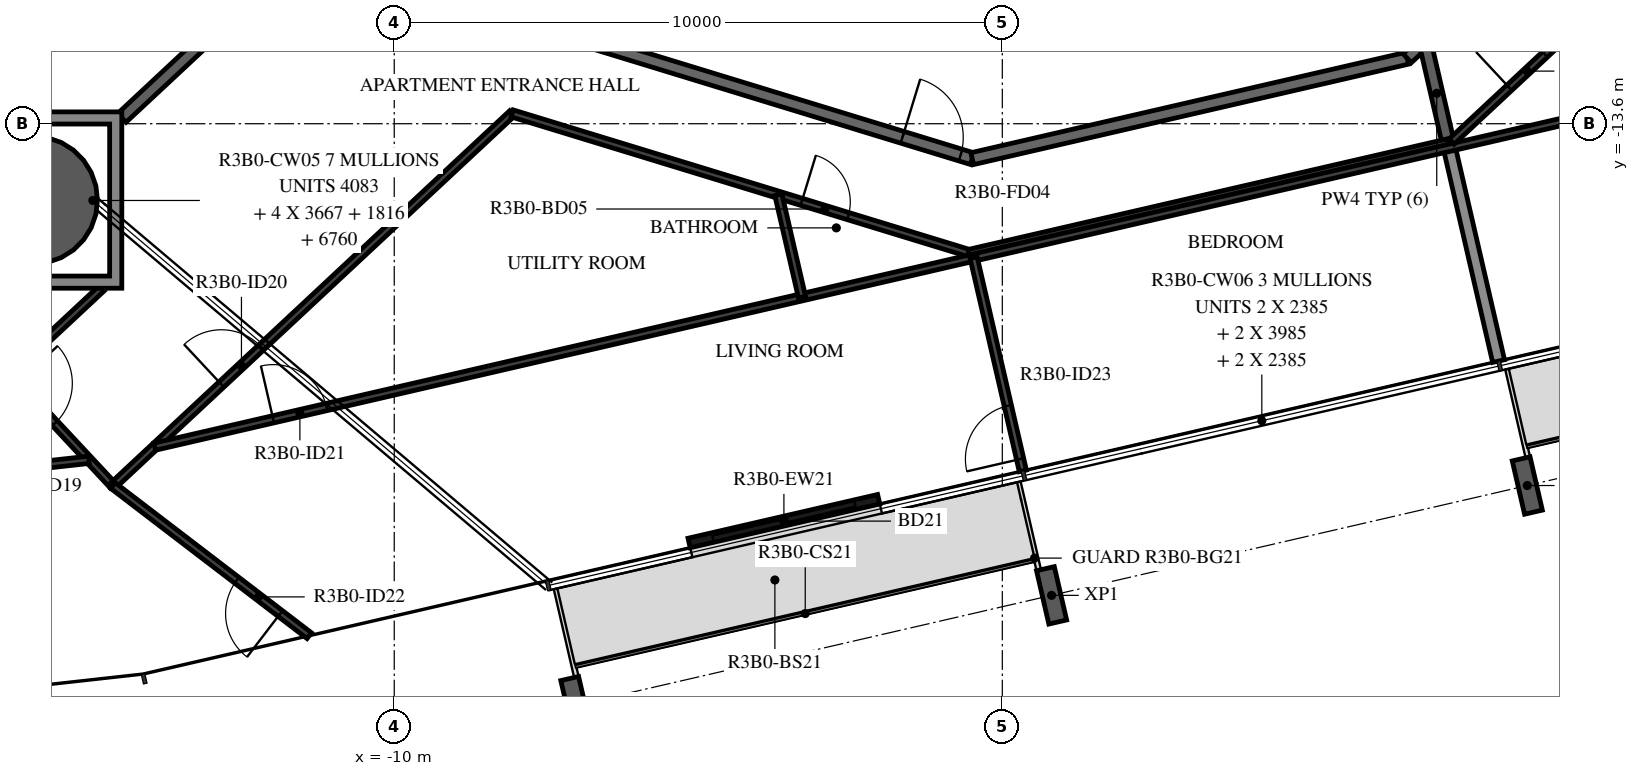
"""IFC4 building model, lengths in metres.
Left out: names, types, materials, properties, quantities, classifications, styles, units other than length and angle.
Written with IfcOpenShell. Run it as: python <this file> out.ifc"""

import sys

from ifc_helpers import new_model, si_unit, direction, frame, frame_2d, origin, origin_2d, place, context, subcontext, project, spatial, polyline, rectangle, hollow_circle, i_section, outline, extrude, element, fill, save


model = new_model("IFC4")
c1 = context("Model", 3, precision=1e-05, world=origin(), true_north=direction((0.0, 1.0)))
c2 = subcontext(c1, "Body", "Model", "MODEL_VIEW")
j1 = project(units=[si_unit("LENGTHUNIT", "METRE"), si_unit("PLANEANGLEUNIT", "RADIAN")], contexts=[c1])
p1 = place(None, origin())
s1 = spatial("IfcSite", under=j1, at=p1, CompositionType="ELEMENT")
p2 = place(p1, origin())
s2 = spatial("IfcBuilding", under=s1, at=p2, CompositionType="ELEMENT")
p3 = place(p2, frame((0.0, 0.0, 127.4)))
s3 = spatial("IfcBuildingStorey", under=s2, at=p3, CompositionType="ELEMENT", Elevation=127.4)
p4 = place(p3, frame((-15.93, -14.855, -0.38), z_axis=(0.0, 0.0, 1.0), x_axis=(1.0, 0.0, 0.0)))
e1 = element("IfcColumn", 1, at=p4, inside=s3, PredefinedType="COLUMN", context=c2, shape_type="SweptSolid", body=[
    extrude(hollow_circle(Radius=1.05, WallThickness=0.05, at=origin_2d()), origin(), (0.0, 0.0, 1.0), 3.5),
])
for number, where, z_axis, x_axis in (
    (2, (8.634, -19.55, -0.38), (0.0, 0.0, 1.0), (-0.974, -0.225, 0.0)),
    (3, (-7.013, -23.162, -0.38), (0.0, 0.0, 1.0), (-0.974, -0.225, 0.0)),
    (4, (0.81, -21.356, -0.38), (0.0, 0.0, 1.0), (-0.974, -0.225, 0.0)),
):
    element("IfcColumn", number, at=place(p3, frame(where, z_axis=z_axis, x_axis=x_axis)), inside=s3, PredefinedType="COLUMN", context=c2, shape_type="SweptSolid", body=[
        extrude(i_section(OverallWidth=0.3, OverallDepth=0.9, WebThickness=0.019, FlangeThickness=0.035, FilletRadius=0.03, at=origin_2d()), origin(), (0.0, 0.0, 1.0), 3.5),
    ])
p5 = place(p3, frame((-5.151, -20.495, 0.0), z_axis=(0.0, 0.0, 1.0), x_axis=(0.974377048991, 0.224920800284, 0.0)))
e5 = element("IfcWall", 5, at=p5, inside=s3, PredefinedType="STANDARD", context=c2, shape_type="SweptSolid", body=[
    extrude(rectangle(XDim=3.2, YDim=0.16, at=frame_2d((1.6, 0.0))), origin(), (0.0, 0.0, 1.0), 3.12),
])
p6 = place(p5, frame((0.4, 0.0, 0.0)))
e6 = element("IfcOpeningElement", 6, at=p6, cuts=e5, PredefinedType="OPENING", context=c2, shape_type="SweptSolid", body=[
    extrude(rectangle(XDim=2.4, YDim=2.4, at=frame_2d((1.2, 1.2))), frame((0.0, 0.09, 0.0), z_axis=(0.0, -1.0, 0.0), x_axis=(1.0, 0.0, 0.0)), (0.0, 0.0, 1.0), 0.18),
])
p7 = place(p3, frame((-7.516, -12.028, 0.0), z_axis=(0.0, 0.0, 1.0), x_axis=(0.956306642771, -0.292365533182, 0.0)))
e7 = element("IfcWall", 7, at=p7, inside=s3, PredefinedType="STANDARD", context=c2, shape_type="SweptSolid", body=[
    extrude(rectangle(XDim=7.342, YDim=0.2, at=frame_2d((3.671, 0.0))), origin(), (0.0, 0.0, 1.0), 3.12),
])
p8 = place(p7, frame((6.142, 0.0, 0.0)))
e8 = element("IfcOpeningElement", 8, at=p8, cuts=e7, PredefinedType="OPENING", context=c2, shape_type="SweptSolid", body=[
    extrude(rectangle(XDim=1.0, YDim=2.1, at=frame_2d((0.5, 1.05))), frame((0.0, 0.11, 0.0), z_axis=(0.0, -1.0, 0.0), x_axis=(1.0, 0.0, 0.0)), (0.0, 0.0, 1.0), 0.22),
])
p9 = place(p3, frame((-0.495, -14.175, 0.0), z_axis=(0.0, 0.0, 1.0), x_axis=(0.974376622151, 0.224922649383, 0.0)))
e9 = element("IfcWall", 9, at=p9, inside=s3, PredefinedType="STANDARD", context=c2, shape_type="SweptSolid", body=[
    extrude(rectangle(XDim=7.342, YDim=0.2, at=frame_2d((3.671, 0.0))), origin(), (0.0, 0.0, 1.0), 3.12),
])
p10 = place(p3, frame((6.659, -12.523, 0.0), z_axis=(0.0, 0.0, 1.0), x_axis=(0.731350455479, 0.682001841105, 0.0)))
e10 = element("IfcWall", 10, at=p10, inside=s3, PredefinedType="STANDARD", context=c2, shape_type="SweptSolid", body=[
    extrude(rectangle(XDim=7.342, YDim=0.2, at=frame_2d((3.671, 0.0))), origin(), (0.0, 0.0, 1.0), 3.12),
])
p11 = place(p10, frame((0.597, 0.0, 0.0)))
e11 = element("IfcOpeningElement", 11, at=p11, cuts=e10, PredefinedType="OPENING", context=c2, shape_type="SweptSolid", body=[
    extrude(rectangle(XDim=1.0, YDim=2.1, at=frame_2d((0.5, 1.05))), frame((0.0, 0.11, 0.0), z_axis=(0.0, -1.0, 0.0), x_axis=(1.0, 0.0, 0.0)), (0.0, 0.0, 1.0), 0.22),
])
p12 = place(p3, frame((-14.479, -13.504, 0.0), z_axis=(0.0, 0.0, 1.0), x_axis=(0.731329393611, 0.682024426278, 0.0)))
e12 = element("IfcWall", 12, at=p12, inside=s3, PredefinedType="STANDARD", context=c2, shape_type="SweptSolid", body=[
    extrude(rectangle(XDim=5.892, YDim=0.2, at=frame_2d((2.946, 0.0))), origin(), (0.0, 0.0, 1.0), 3.12),
])
p13 = place(p3, frame((7.34, -13.946, 0.0), z_axis=(0.0, 0.0, 1.0), x_axis=(-0.224849249613, 0.974393562658, 0.0)))
e13 = element("IfcWall", 13, at=p13, inside=s3, PredefinedType="STANDARD", context=c2, shape_type="SweptSolid", body=[
    extrude(rectangle(XDim=1.738, YDim=0.2, at=frame_2d((0.869, 0.0))), origin(), (0.0, 0.0, 1.0), 3.12),
])
p14 = place(p3, frame((8.161, -17.504, 0.0), z_axis=(0.0, 0.0, 1.0), x_axis=(-0.224943703639, 0.9743717618, 0.0)))
e14 = element("IfcWall", 14, at=p14, inside=s3, PredefinedType="STANDARD", context=c2, shape_type="SweptSolid", body=[
    extrude(rectangle(XDim=3.6, YDim=0.2, at=frame_2d((1.8, 0.0))), origin(), (0.0, 0.0, 1.0), 2.73),
])
p15 = place(p3, frame((-14.81, -16.305, 0.0), z_axis=(0.0, 0.0, 1.0), x_axis=(-0.73134426424, -0.682008480272, 0.0)))
e15 = element("IfcWall", 15, at=p15, inside=s3, PredefinedType="PARTITIONING", context=c2, shape_type="SweptSolid", body=[
    extrude(rectangle(XDim=2.078, YDim=0.12, at=frame_2d((1.039, 0.0))), origin(), (0.0, 0.0, 1.0), 3.12),
])
p16 = place(p3, frame((-16.33, -17.723, 0.0), z_axis=(0.0, 0.0, 1.0), x_axis=(0.682018966854, -0.731334484933, 0.0)))
e16 = element("IfcWall", 16, at=p16, inside=s3, PredefinedType="PARTITIONING", context=c2, shape_type="SweptSolid", body=[
    extrude(rectangle(XDim=2.5, YDim=0.12, at=frame_2d((1.25, 0.0))), origin(), (0.0, 0.0, 1.0), 3.12),
])
p17 = place(p16, frame((0.2, 0.0, 0.0)))
e17 = element("IfcOpeningElement", 17, at=p17, cuts=e16, PredefinedType="OPENING", context=c2, shape_type="SweptSolid", body=[
    extrude(rectangle(XDim=0.9, YDim=2.1, at=frame_2d((0.45, 1.05))), frame((0.0, 0.07, 0.0), z_axis=(0.0, -1.0, 0.0), x_axis=(1.0, 0.0, 0.0)), (0.0, 0.0, 1.0), 0.14),
])
p18 = place(p3, frame((-14.625, -19.551, 0.0), z_axis=(0.0, 0.0, 1.0), x_axis=(0.731348282704, 0.682004171091, 0.0)))
e18 = element("IfcWall", 18, at=p18, inside=s3, PredefinedType="PARTITIONING", context=c2, shape_type="SweptSolid", body=[
    extrude(rectangle(XDim=8.975, YDim=0.12, at=frame_2d((4.488, 0.0))), origin(), (0.0, 0.0, 1.0), 3.12),
])
p19 = place(p18, frame((2.438, 0.0, 0.0)))
e19 = element("IfcOpeningElement", 19, at=p19, cuts=e18, PredefinedType="OPENING", context=c2, shape_type="SweptSolid", body=[
    extrude(rectangle(XDim=0.9, YDim=2.1, at=frame_2d((0.45, 1.05))), frame((0.0, 0.07, 0.0), z_axis=(0.0, -1.0, 0.0), x_axis=(1.0, 0.0, 0.0)), (0.0, 0.0, 1.0), 0.14),
])
p20 = place(p3, frame((-8.061, -13.43, 0.0), z_axis=(0.0, 0.0, 1.0), x_axis=(0.956302336653, -0.292379617814, 0.0)))
e20 = element("IfcWall", 20, at=p20, inside=s3, PredefinedType="PARTITIONING", context=c2, shape_type="SweptSolid", body=[
    extrude(rectangle(XDim=7.855, YDim=0.12, at=frame_2d((3.927, 0.0))), origin(), (0.0, 0.0, 1.0), 3.12),
])
p21 = place(p20, frame((4.979, 0.0, 0.0)))
e21 = element("IfcOpeningElement", 21, at=p21, cuts=e20, PredefinedType="OPENING", context=c2, shape_type="SweptSolid", body=[
    extrude(rectangle(XDim=0.8, YDim=2.1, at=frame_2d((0.4, 1.05))), frame((0.0, 0.07, 0.0), z_axis=(0.0, -1.0, 0.0), x_axis=(1.0, 0.0, 0.0)), (0.0, 0.0, 1.0), 0.14),
])
p22 = place(p3, frame((-0.549, -15.727, 0.0), z_axis=(0.0, 0.0, 1.0), x_axis=(0.97436829548, 0.224958717908, 0.0)))
e22 = element("IfcWall", 22, at=p22, inside=s3, PredefinedType="PARTITIONING", context=c2, shape_type="SweptSolid", body=[
    extrude(rectangle(XDim=8.087, YDim=0.12, at=frame_2d((4.044, 0.0))), origin(), (0.0, 0.0, 1.0), 3.12),
])
p23 = place(p3, frame((-15.956, -19.231, 0.0), z_axis=(0.0, 0.0, 1.0), x_axis=(0.993867897435, 0.110573968218, 0.0)))
e23 = element("IfcWall", 23, at=p23, inside=s3, PredefinedType="PARTITIONING", context=c2, shape_type="SweptSolid", body=[
    extrude(rectangle(XDim=0.941, YDim=0.12, at=frame_2d((0.47, 0.0))), origin(), (0.0, 0.0, 1.0), 3.12),
])
p24 = place(p3, frame((-11.397, -22.019, 0.0), z_axis=(0.0, 0.0, 1.0), x_axis=(-0.794391941464, 0.60740550157, 0.0)))
e24 = element("IfcWall", 24, at=p24, inside=s3, PredefinedType="PARTITIONING", context=c2, shape_type="SweptSolid", body=[
    extrude(rectangle(XDim=4.063, YDim=0.12, at=frame_2d((2.032, 0.0))), origin(), (0.0, 0.0, 1.0), 3.12),
])
p25 = place(p24, frame((0.6, 0.0, 0.0)))
e25 = element("IfcOpeningElement", 25, at=p25, cuts=e24, PredefinedType="OPENING", context=c2, shape_type="SweptSolid", body=[
    extrude(rectangle(XDim=0.9, YDim=2.1, at=frame_2d((0.45, 1.05))), frame((0.0, 0.07, 0.0), z_axis=(0.0, -1.0, 0.0), x_axis=(1.0, 0.0, 0.0)), (0.0, 0.0, 1.0), 0.14),
])
p26 = place(p3, frame((-13.939, -18.911, 0.0), z_axis=(0.0, 0.0, 1.0), x_axis=(0.974369607456, 0.224953035245, 0.0)))
e26 = element("IfcWall", 26, at=p26, inside=s3, PredefinedType="PARTITIONING", context=c2, shape_type="SweptSolid", body=[
    extrude(rectangle(XDim=33.934, YDim=0.12, at=frame_2d((16.967, 0.0))), origin(), (0.0, 0.0, 1.0), 3.12),
])
p27 = place(p26, frame((2.0, 0.0, 0.0)))
e27 = element("IfcOpeningElement", 27, at=p27, cuts=e26, PredefinedType="OPENING", context=c2, shape_type="SweptSolid", body=[
    extrude(rectangle(XDim=0.9, YDim=2.1, at=frame_2d((0.45, 1.05))), frame((0.0, 0.07, 0.0), z_axis=(0.0, -1.0, 0.0), x_axis=(1.0, 0.0, 0.0)), (0.0, 0.0, 1.0), 0.14),
])
p28 = place(p26, frame((28.154, 0.0, 0.0)))
e28 = element("IfcOpeningElement", 28, at=p28, cuts=e26, PredefinedType="OPENING", context=c2, shape_type="SweptSolid", body=[
    extrude(rectangle(XDim=0.9, YDim=2.1, at=frame_2d((0.45, 1.05))), frame((0.0, 0.07, 0.0), z_axis=(0.0, -1.0, 0.0), x_axis=(1.0, 0.0, 0.0)), (0.0, 0.0, 1.0), 0.14),
])
p29 = place(p26, frame((30.039, 0.0, 0.0)))
e29 = element("IfcOpeningElement", 29, at=p29, cuts=e26, PredefinedType="OPENING", context=c2, shape_type="SweptSolid", body=[
    extrude(rectangle(XDim=0.9, YDim=2.1, at=frame_2d((0.45, 1.05))), frame((0.0, 0.07, 0.0), z_axis=(0.0, -1.0, 0.0), x_axis=(1.0, 0.0, 0.0)), (0.0, 0.0, 1.0), 0.14),
])
p30 = place(p3, frame((-3.294, -16.454, 0.0), z_axis=(0.0, 0.0, 1.0), x_axis=(-0.224890438003, 0.974384057184, 0.0)))
e30 = element("IfcWall", 30, at=p30, inside=s3, PredefinedType="PARTITIONING", context=c2, shape_type="SweptSolid", body=[
    extrude(rectangle(XDim=1.729, YDim=0.12, at=frame_2d((0.865, 0.0))), origin(), (0.0, 0.0, 1.0), 3.12),
])
p31 = place(p3, frame((0.338, -19.31, 0.0), z_axis=(0.0, 0.0, 1.0), x_axis=(-0.224943703639, 0.9743717618, 0.0)))
e31 = element("IfcWall", 31, at=p31, inside=s3, PredefinedType="PARTITIONING", context=c2, shape_type="SweptSolid", body=[
    extrude(rectangle(XDim=3.6, YDim=0.12, at=frame_2d((1.8, 0.0))), origin(), (0.0, 0.0, 1.0), 2.73),
])
p32 = place(p31, frame((0.2, 0.0, 0.0)))
e32 = element("IfcOpeningElement", 32, at=p32, cuts=e31, PredefinedType="OPENING", context=c2, shape_type="SweptSolid", body=[
    extrude(rectangle(XDim=0.9, YDim=2.1, at=frame_2d((0.45, 1.05))), frame((0.0, 0.07, 0.0), z_axis=(0.0, -1.0, 0.0), x_axis=(1.0, 0.0, 0.0)), (0.0, 0.0, 1.0), 0.14),
])
p33 = place(p3, frame((7.388, -13.894, 0.0), z_axis=(0.0, 0.0, 1.0), x_axis=(0.731346321845, 0.682006273815, 0.0)))
e33 = element("IfcWall", 33, at=p33, inside=s3, PredefinedType="PARTITIONING", context=c2, shape_type="SweptSolid", body=[
    extrude(rectangle(XDim=7.585, YDim=0.12, at=frame_2d((3.793, 0.0))), origin(), (0.0, 0.0, 1.0), 3.12),
])
p34 = place(p33, frame((1.3, 0.0, 0.0)))
e34 = element("IfcOpeningElement", 34, at=p34, cuts=e33, PredefinedType="OPENING", context=c2, shape_type="SweptSolid", body=[
    extrude(rectangle(XDim=0.8, YDim=2.1, at=frame_2d((0.4, 1.05))), frame((0.0, 0.07, 0.0), z_axis=(0.0, -1.0, 0.0), x_axis=(1.0, 0.0, 0.0)), (0.0, 0.0, 1.0), 0.14),
])
p35 = place(p3, origin())
e35 = element("IfcWall", 35, at=p35, inside=s3, PredefinedType="STANDARD", context=c2, shape_type="SweptSolid", body=[
    extrude(outline(polyline([(-14.48, -13.405), (-14.48, -16.305), (-17.38, -16.305), (-17.38, -13.405), (-14.48, -13.405)]), holes=[polyline([(-17.18, -16.105), (-14.68, -16.105), (-14.68, -13.605), (-17.18, -13.605), (-17.18, -16.105)])]), origin(), (0.0, 0.0, 1.0), 3.12),
])
p36 = place(p6, origin())
e36 = element("IfcDoor", 36, at=p36, inside=s3, OperationType="DOUBLE_DOOR_SLIDING", PredefinedType="DOOR", context=c2, shape_type="SweptSolid", body=[
    extrude(rectangle(XDim=2.4, YDim=2.4, at=frame_2d((1.2, 1.2))), frame((0.0, 0.025, 0.0), z_axis=(0.0, -1.0, 0.0), x_axis=(1.0, 0.0, 0.0)), (0.0, 0.0, 1.0), 0.05),
])
fill(e6, e36)
p37 = place(p8, origin())
e37 = element("IfcDoor", 37, at=p37, inside=s3, OperationType="SINGLE_SWING_LEFT", PredefinedType="DOOR", context=c2, shape_type="SweptSolid", body=[
    extrude(rectangle(XDim=1.0, YDim=2.1, at=frame_2d((0.5, 1.05))), frame((0.0, 0.025, 0.0), z_axis=(0.0, -1.0, 0.0), x_axis=(1.0, 0.0, 0.0)), (0.0, 0.0, 1.0), 0.05),
])
fill(e8, e37)
p38 = place(p17, origin())
e38 = element("IfcDoor", 38, at=p38, inside=s3, OperationType="SINGLE_SWING_LEFT", PredefinedType="DOOR", context=c2, shape_type="SweptSolid", body=[
    extrude(rectangle(XDim=0.9, YDim=2.1, at=frame_2d((0.45, 1.05))), frame((0.0, 0.025, 0.0), z_axis=(0.0, -1.0, 0.0), x_axis=(1.0, 0.0, 0.0)), (0.0, 0.0, 1.0), 0.05),
])
fill(e17, e38)
p39 = place(p19, origin())
e39 = element("IfcDoor", 39, at=p39, inside=s3, OperationType="SINGLE_SWING_LEFT", PredefinedType="DOOR", context=c2, shape_type="SweptSolid", body=[
    extrude(rectangle(XDim=0.9, YDim=2.1, at=frame_2d((0.45, 1.05))), frame((0.0, 0.025, 0.0), z_axis=(0.0, -1.0, 0.0), x_axis=(1.0, 0.0, 0.0)), (0.0, 0.0, 1.0), 0.05),
])
fill(e19, e39)
p40 = place(p21, origin())
e40 = element("IfcDoor", 40, at=p40, inside=s3, OperationType="SINGLE_SWING_LEFT", PredefinedType="DOOR", context=c2, shape_type="SweptSolid", body=[
    extrude(rectangle(XDim=0.8, YDim=2.1, at=frame_2d((0.4, 1.05))), frame((0.0, 0.025, 0.0), z_axis=(0.0, -1.0, 0.0), x_axis=(1.0, 0.0, 0.0)), (0.0, 0.0, 1.0), 0.05),
])
fill(e21, e40)
p41 = place(p27, origin())
e41 = element("IfcDoor", 41, at=p41, inside=s3, OperationType="SINGLE_SWING_LEFT", PredefinedType="DOOR", context=c2, shape_type="SweptSolid", body=[
    extrude(rectangle(XDim=0.9, YDim=2.1, at=frame_2d((0.45, 1.05))), frame((0.0, 0.025, 0.0), z_axis=(0.0, -1.0, 0.0), x_axis=(1.0, 0.0, 0.0)), (0.0, 0.0, 1.0), 0.05),
])
fill(e27, e41)
p42 = place(p25, origin())
e42 = element("IfcDoor", 42, at=p42, inside=s3, OperationType="SINGLE_SWING_LEFT", PredefinedType="DOOR", context=c2, shape_type="SweptSolid", body=[
    extrude(rectangle(XDim=0.9, YDim=2.1, at=frame_2d((0.45, 1.05))), frame((0.0, 0.025, 0.0), z_axis=(0.0, -1.0, 0.0), x_axis=(1.0, 0.0, 0.0)), (0.0, 0.0, 1.0), 0.05),
])
fill(e25, e42)
p43 = place(p32, origin())
e43 = element("IfcDoor", 43, at=p43, inside=s3, OperationType="SINGLE_SWING_RIGHT", PredefinedType="DOOR", context=c2, shape_type="SweptSolid", body=[
    extrude(rectangle(XDim=0.9, YDim=2.1, at=frame_2d((0.45, 1.05))), frame((0.0, 0.025, 0.0), z_axis=(0.0, -1.0, 0.0), x_axis=(1.0, 0.0, 0.0)), (0.0, 0.0, 1.0), 0.05),
])
fill(e32, e43)
p44 = place(p34, origin())
e44 = element("IfcDoor", 44, at=p44, inside=s3, OperationType="SINGLE_SWING_RIGHT", PredefinedType="DOOR", context=c2, shape_type="SweptSolid", body=[
    extrude(rectangle(XDim=0.8, YDim=2.1, at=frame_2d((0.4, 1.05))), frame((0.0, 0.025, 0.0), z_axis=(0.0, -1.0, 0.0), x_axis=(1.0, 0.0, 0.0)), (0.0, 0.0, 1.0), 0.05),
])
fill(e34, e44)
save(model, sys.argv[1])
